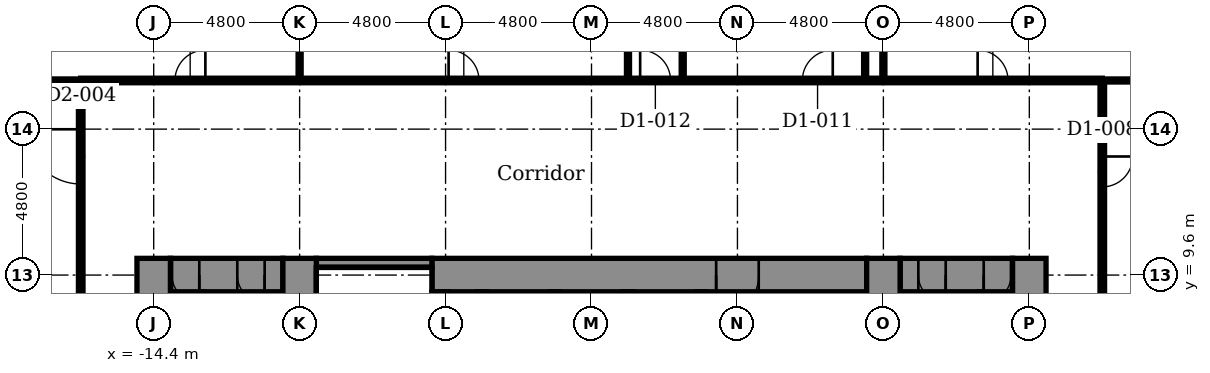
"""IFC4 building model, lengths in metres.
Left out: names, types, materials, properties, quantities, classifications, styles, units other than length and angle.
Written with IfcOpenShell. Run it as: python <this file> out.ifc"""

import sys

from ifc_helpers import new_model, si_unit, direction, frame, frame_2d, origin, place, context, subcontext, project, spatial, rectangle, extrude, element, fill, save


model = new_model("IFC4")
c1 = context("Model", 3, precision=1e-05, world=origin(), true_north=direction((0.0, 1.0)))
c2 = subcontext(c1, "Body", "Model", "MODEL_VIEW")
j1 = project(units=[si_unit("LENGTHUNIT", "METRE"), si_unit("PLANEANGLEUNIT", "RADIAN")], contexts=[c1])
p1 = place(None, origin())
s1 = spatial("IfcSite", under=j1, at=p1, CompositionType="ELEMENT")
p2 = place(p1, origin())
s2 = spatial("IfcBuilding", under=s1, at=p2, CompositionType="ELEMENT")
p3 = place(p2, origin())
s3 = spatial("IfcBuildingStorey", under=s2, at=p3, CompositionType="ELEMENT", Elevation=0.0)
p4 = place(p3, frame((-13.85, 9.6, -0.4), z_axis=(0.0, 0.0, 1.0), x_axis=(1.0, 0.0, 0.0)))
e1 = element("IfcWall", 1, at=p4, inside=s3, PredefinedType="SHEAR", context=c2, shape_type="SweptSolid", body=[
    extrude(rectangle(XDim=3.7, YDim=1.1, at=frame_2d((1.85, 0.0))), origin(), (0.0, 0.0, 1.0), 7.1),
])
p5 = place(p4, frame((0.05, 0.0, 0.4)))
e2 = element("IfcOpeningElement", 2, at=p5, cuts=e1, PredefinedType="OPENING", context=c2, shape_type="SweptSolid", body=[
    extrude(rectangle(XDim=0.9, YDim=2.1, at=frame_2d((0.45, 1.05))), frame((0.0, 0.56, 0.0), z_axis=(0.0, -1.0, 0.0), x_axis=(1.0, 0.0, 0.0)), (0.0, 0.0, 1.0), 1.12),
])
p6 = place(p4, frame((2.2, 0.0, 0.4)))
e3 = element("IfcOpeningElement", 3, at=p6, cuts=e1, PredefinedType="OPENING", context=c2, shape_type="SweptSolid", body=[
    extrude(rectangle(XDim=0.9, YDim=2.1, at=frame_2d((0.45, 1.05))), frame((0.0, 0.56, 0.0), z_axis=(0.0, -1.0, 0.0), x_axis=(1.0, 0.0, 0.0)), (0.0, 0.0, 1.0), 1.12),
])
p7 = place(p3, frame((-5.25, 9.6, -0.4), z_axis=(0.0, 0.0, 1.0), x_axis=(1.0, 0.0, 0.0)))
e4 = element("IfcWall", 4, at=p7, inside=s3, PredefinedType="SHEAR", context=c2, shape_type="SweptSolid", body=[
    extrude(rectangle(XDim=14.3, YDim=1.1, at=frame_2d((7.15, 0.0))), origin(), (0.0, 0.0, 1.0), 7.1),
])
p8 = place(p7, frame((9.35, 0.0, 0.4)))
e5 = element("IfcOpeningElement", 5, at=p8, cuts=e4, PredefinedType="OPENING", context=c2, shape_type="SweptSolid", body=[
    extrude(rectangle(XDim=1.4, YDim=2.1, at=frame_2d((0.7, 1.05))), frame((0.0, 0.56, 0.0), z_axis=(0.0, -1.0, 0.0), x_axis=(1.0, 0.0, 0.0)), (0.0, 0.0, 1.0), 1.12),
])
p9 = place(p3, frame((10.15, 9.6, -0.4), z_axis=(0.0, 0.0, 1.0), x_axis=(1.0, 0.0, 0.0)))
e6 = element("IfcWall", 6, at=p9, inside=s3, PredefinedType="SHEAR", context=c2, shape_type="SweptSolid", body=[
    extrude(rectangle(XDim=3.7, YDim=1.1, at=frame_2d((1.85, 0.0))), origin(), (0.0, 0.0, 1.0), 7.1),
])
p10 = place(p9, frame((0.6, 0.0, 0.4)))
e7 = element("IfcOpeningElement", 7, at=p10, cuts=e6, PredefinedType="OPENING", context=c2, shape_type="SweptSolid", body=[
    extrude(rectangle(XDim=0.9, YDim=2.1, at=frame_2d((0.45, 1.05))), frame((0.0, 0.56, 0.0), z_axis=(0.0, -1.0, 0.0), x_axis=(1.0, 0.0, 0.0)), (0.0, 0.0, 1.0), 1.12),
])
p11 = place(p9, frame((2.75, 0.0, 0.4)))
e8 = element("IfcOpeningElement", 8, at=p11, cuts=e6, PredefinedType="OPENING", context=c2, shape_type="SweptSolid", body=[
    extrude(rectangle(XDim=0.9, YDim=2.1, at=frame_2d((0.45, 1.05))), frame((0.0, 0.56, 0.0), z_axis=(0.0, -1.0, 0.0), x_axis=(1.0, 0.0, 0.0)), (0.0, 0.0, 1.0), 1.12),
])
p12 = place(p3, frame((-9.05, 10.0, -0.4), z_axis=(0.0, 0.0, 1.0), x_axis=(1.0, 0.0, 0.0)))
e9 = element("IfcWall", 9, at=p12, inside=s3, PredefinedType="STANDARD", context=c2, shape_type="SweptSolid", body=[
    extrude(rectangle(XDim=3.8, YDim=0.3, at=frame_2d((1.9, 0.0))), origin(), (0.0, 0.0, 1.0), 7.1),
])
p13 = place(p3, frame((-14.4, -10.15, -0.4), z_axis=(0.0, 0.0, 1.0), x_axis=(0.0, 1.0, 0.0)))
e10 = element("IfcWall", 10, at=p13, inside=s3, PredefinedType="SHEAR", context=c2, shape_type="SweptSolid", body=[
    extrude(rectangle(XDim=20.3, YDim=1.1, at=frame_2d((10.15, 0.0))), origin(), (0.0, 0.0, 1.0), 7.1),
])
p14 = place(p13, frame((3.6, 0.0, 0.4)))
e11 = element("IfcOpeningElement", 11, at=p14, cuts=e10, PredefinedType="OPENING", context=c2, shape_type="SweptSolid", body=[
    extrude(rectangle(XDim=1.1, YDim=2.1, at=frame_2d((0.55, 1.05))), frame((0.0, 0.56, 0.0), z_axis=(0.0, -1.0, 0.0), x_axis=(1.0, 0.0, 0.0)), (0.0, 0.0, 1.0), 1.12),
])
p15 = place(p13, frame((6.0, 0.0, 0.4)))
e12 = element("IfcOpeningElement", 12, at=p15, cuts=e10, PredefinedType="OPENING", context=c2, shape_type="SweptSolid", body=[
    extrude(rectangle(XDim=1.1, YDim=2.1, at=frame_2d((0.55, 1.05))), frame((0.0, 0.56, 0.0), z_axis=(0.0, -1.0, 0.0), x_axis=(1.0, 0.0, 0.0)), (0.0, 0.0, 1.0), 1.12),
])
p16 = place(p13, frame((8.4, 0.0, 0.4)))
e13 = element("IfcOpeningElement", 13, at=p16, cuts=e10, PredefinedType="OPENING", context=c2, shape_type="SweptSolid", body=[
    extrude(rectangle(XDim=1.1, YDim=2.1, at=frame_2d((0.55, 1.05))), frame((0.0, 0.56, 0.0), z_axis=(0.0, -1.0, 0.0), x_axis=(1.0, 0.0, 0.0)), (0.0, 0.0, 1.0), 1.12),
])
p17 = place(p13, frame((10.8, 0.0, 0.4)))
e14 = element("IfcOpeningElement", 14, at=p17, cuts=e10, PredefinedType="OPENING", context=c2, shape_type="SweptSolid", body=[
    extrude(rectangle(XDim=1.1, YDim=2.1, at=frame_2d((0.55, 1.05))), frame((0.0, 0.56, 0.0), z_axis=(0.0, -1.0, 0.0), x_axis=(1.0, 0.0, 0.0)), (0.0, 0.0, 1.0), 1.12),
])
p18 = place(p13, frame((13.2, 0.0, 0.4)))
e15 = element("IfcOpeningElement", 15, at=p18, cuts=e10, PredefinedType="OPENING", context=c2, shape_type="SweptSolid", body=[
    extrude(rectangle(XDim=1.1, YDim=2.1, at=frame_2d((0.55, 1.05))), frame((0.0, 0.56, 0.0), z_axis=(0.0, -1.0, 0.0), x_axis=(1.0, 0.0, 0.0)), (0.0, 0.0, 1.0), 1.12),
])
p19 = place(p13, frame((15.6, 0.0, 0.4)))
e16 = element("IfcOpeningElement", 16, at=p19, cuts=e10, PredefinedType="OPENING", context=c2, shape_type="SweptSolid", body=[
    extrude(rectangle(XDim=1.1, YDim=2.1, at=frame_2d((0.55, 1.05))), frame((0.0, 0.56, 0.0), z_axis=(0.0, -1.0, 0.0), x_axis=(1.0, 0.0, 0.0)), (0.0, 0.0, 1.0), 1.12),
])
p20 = place(p3, frame((-9.6, 2.55, -0.4), z_axis=(0.0, 0.0, 1.0), x_axis=(0.0, 1.0, 0.0)))
e17 = element("IfcWall", 17, at=p20, inside=s3, PredefinedType="SHEAR", context=c2, shape_type="SweptSolid", body=[
    extrude(rectangle(XDim=7.6, YDim=1.1, at=frame_2d((3.8, 0.0))), origin(), (0.0, 0.0, 1.0), 7.1),
])
p21 = place(p3, frame((-5.1, 2.25, -0.4), z_axis=(0.0, 0.0, 1.0), x_axis=(0.0, 1.0, 0.0)))
e18 = element("IfcWall", 18, at=p21, inside=s3, PredefinedType="STANDARD", context=c2, shape_type="SweptSolid", body=[
    extrude(rectangle(XDim=6.8, YDim=0.3, at=frame_2d((3.4, 0.0))), origin(), (0.0, 0.0, 1.0), 7.1),
])
p22 = place(p21, frame((2.0, 0.0, 0.4)))
e19 = element("IfcOpeningElement", 19, at=p22, cuts=e18, PredefinedType="OPENING", context=c2, shape_type="SweptSolid", body=[
    extrude(rectangle(XDim=1.2, YDim=2.1, at=frame_2d((0.6, 1.05))), frame((0.0, 0.16, 0.0), z_axis=(0.0, -1.0, 0.0), x_axis=(1.0, 0.0, 0.0)), (0.0, 0.0, 1.0), 0.32),
])
for number, where, z_axis, x_axis in (
    (20, (-3.6, 5.85, -0.4), (0.0, 0.0, 1.0), (0.0, 1.0, 0.0)),
    (21, (-1.2, 5.85, -0.4), (0.0, 0.0, 1.0), (0.0, 1.0, 0.0)),
    (22, (1.2, 5.85, -0.4), (0.0, 0.0, 1.0), (0.0, 1.0, 0.0)),
    (23, (3.6, 5.85, -0.4), (0.0, 0.0, 1.0), (0.0, 1.0, 0.0)),
):
    element("IfcWall", number, at=place(p3, frame(where, z_axis=z_axis, x_axis=x_axis)), inside=s3, PredefinedType="STANDARD", context=c2, shape_type="SweptSolid", body=[
        extrude(rectangle(XDim=3.2, YDim=0.3, at=frame_2d((1.6, 0.0))), origin(), (0.0, 0.0, 1.0), 7.1),
    ])
p23 = place(p3, frame((9.6, -10.15, -0.4), z_axis=(0.0, 0.0, 1.0), x_axis=(0.0, 1.0, 0.0)))
e24 = element("IfcWall", 24, at=p23, inside=s3, PredefinedType="SHEAR", context=c2, shape_type="SweptSolid", body=[
    extrude(rectangle(XDim=20.3, YDim=1.1, at=frame_2d((10.15, 0.0))), origin(), (0.0, 0.0, 1.0), 7.1),
])
p24 = place(p3, frame((14.4, -10.15, -0.4), z_axis=(0.0, 0.0, 1.0), x_axis=(0.0, 1.0, 0.0)))
e25 = element("IfcWall", 25, at=p24, inside=s3, PredefinedType="SHEAR", context=c2, shape_type="SweptSolid", body=[
    extrude(rectangle(XDim=20.3, YDim=1.1, at=frame_2d((10.15, 0.0))), origin(), (0.0, 0.0, 1.0), 7.1),
])
p25 = place(p24, frame((3.6, 0.0, 0.4)))
e26 = element("IfcOpeningElement", 26, at=p25, cuts=e25, PredefinedType="OPENING", context=c2, shape_type="SweptSolid", body=[
    extrude(rectangle(XDim=1.1, YDim=2.1, at=frame_2d((0.55, 1.05))), frame((0.0, 0.56, 0.0), z_axis=(0.0, -1.0, 0.0), x_axis=(1.0, 0.0, 0.0)), (0.0, 0.0, 1.0), 1.12),
])
p26 = place(p24, frame((6.0, 0.0, 0.4)))
e27 = element("IfcOpeningElement", 27, at=p26, cuts=e25, PredefinedType="OPENING", context=c2, shape_type="SweptSolid", body=[
    extrude(rectangle(XDim=1.1, YDim=2.1, at=frame_2d((0.55, 1.05))), frame((0.0, 0.56, 0.0), z_axis=(0.0, -1.0, 0.0), x_axis=(1.0, 0.0, 0.0)), (0.0, 0.0, 1.0), 1.12),
])
p27 = place(p24, frame((8.4, 0.0, 0.4)))
e28 = element("IfcOpeningElement", 28, at=p27, cuts=e25, PredefinedType="OPENING", context=c2, shape_type="SweptSolid", body=[
    extrude(rectangle(XDim=1.1, YDim=2.1, at=frame_2d((0.55, 1.05))), frame((0.0, 0.56, 0.0), z_axis=(0.0, -1.0, 0.0), x_axis=(1.0, 0.0, 0.0)), (0.0, 0.0, 1.0), 1.12),
])
p28 = place(p24, frame((10.8, 0.0, 0.4)))
e29 = element("IfcOpeningElement", 29, at=p28, cuts=e25, PredefinedType="OPENING", context=c2, shape_type="SweptSolid", body=[
    extrude(rectangle(XDim=1.1, YDim=2.1, at=frame_2d((0.55, 1.05))), frame((0.0, 0.56, 0.0), z_axis=(0.0, -1.0, 0.0), x_axis=(1.0, 0.0, 0.0)), (0.0, 0.0, 1.0), 1.12),
])
p29 = place(p24, frame((13.2, 0.0, 0.4)))
e30 = element("IfcOpeningElement", 30, at=p29, cuts=e25, PredefinedType="OPENING", context=c2, shape_type="SweptSolid", body=[
    extrude(rectangle(XDim=1.1, YDim=2.1, at=frame_2d((0.55, 1.05))), frame((0.0, 0.56, 0.0), z_axis=(0.0, -1.0, 0.0), x_axis=(1.0, 0.0, 0.0)), (0.0, 0.0, 1.0), 1.12),
])
p30 = place(p24, frame((15.6, 0.0, 0.4)))
e31 = element("IfcOpeningElement", 31, at=p30, cuts=e25, PredefinedType="OPENING", context=c2, shape_type="SweptSolid", body=[
    extrude(rectangle(XDim=1.1, YDim=2.1, at=frame_2d((0.55, 1.05))), frame((0.0, 0.56, 0.0), z_axis=(0.0, -1.0, 0.0), x_axis=(1.0, 0.0, 0.0)), (0.0, 0.0, 1.0), 1.12),
])
p31 = place(p3, frame((16.8, 3.95, 0.0), z_axis=(0.0, 0.0, 1.0), x_axis=(0.0, 1.0, 0.0)))
e32 = element("IfcWall", 32, at=p31, inside=s3, PredefinedType="PARTITIONING", context=c2, shape_type="SweptSolid", body=[
    extrude(rectangle(XDim=12.05, YDim=0.15, at=frame_2d((6.025, 0.0))), origin(), (0.0, 0.0, 1.0), 6.7),
])
p32 = place(p31, frame((0.95, 0.0, 0.0)))
e33 = element("IfcOpeningElement", 33, at=p32, cuts=e32, PredefinedType="OPENING", context=c2, shape_type="SweptSolid", body=[
    extrude(rectangle(XDim=1.0, YDim=2.1, at=frame_2d((0.5, 1.05))), frame((0.0, 0.085, 0.0), z_axis=(0.0, -1.0, 0.0), x_axis=(1.0, 0.0, 0.0)), (0.0, 0.0, 1.0), 0.17),
])
p33 = place(p31, frame((8.55, 0.0, 0.0)))
e34 = element("IfcOpeningElement", 34, at=p33, cuts=e32, PredefinedType="OPENING", context=c2, shape_type="SweptSolid", body=[
    extrude(rectangle(XDim=1.0, YDim=2.1, at=frame_2d((0.5, 1.05))), frame((0.0, 0.085, 0.0), z_axis=(0.0, -1.0, 0.0), x_axis=(1.0, 0.0, 0.0)), (0.0, 0.0, 1.0), 0.17),
])
p34 = place(p3, frame((12.8, 7.35, 0.0), z_axis=(0.0, 0.0, 1.0), x_axis=(0.0, 1.0, 0.0)))
e35 = element("IfcWall", 35, at=p34, inside=s3, PredefinedType="PARTITIONING", context=c2, shape_type="SweptSolid", body=[
    extrude(rectangle(XDim=1.7, YDim=0.1, at=frame_2d((0.85, 0.0))), origin(), (0.0, 0.0, 1.0), 6.7),
])
p35 = place(p3, frame((9.6, 16.0, 0.0), z_axis=(0.0, 0.0, 1.0), x_axis=(0.0, 1.0, 0.0)))
e36 = element("IfcWall", 36, at=p35, inside=s3, PredefinedType="PARTITIONING", context=c2, shape_type="SweptSolid", body=[
    extrude(rectangle(XDim=2.64, YDim=0.1, at=frame_2d((1.32, 0.0))), origin(), (0.0, 0.0, 1.0), 6.293),
])
for number, where, z_axis, x_axis in (
    (37, (9.0, 16.0, 0.0), (0.0, 0.0, 1.0), (0.0, 1.0, 0.0)),
    (38, (3.0, 16.0, 0.0), (0.0, 0.0, 1.0), (0.0, 1.0, 0.0)),
):
    element("IfcWall", number, at=place(p3, frame(where, z_axis=z_axis, x_axis=x_axis)), inside=s3, PredefinedType="PARTITIONING", context=c2, shape_type="SweptSolid", body=[
        extrude(rectangle(XDim=4.7, YDim=0.1, at=frame_2d((2.35, 0.0))), origin(), (0.0, 0.0, 1.0), 6.7),
    ])
p36 = place(p3, frame((1.2, 16.0, 0.0), z_axis=(0.0, 0.0, 1.0), x_axis=(0.0, 1.0, 0.0)))
e39 = element("IfcWall", 39, at=p36, inside=s3, PredefinedType="PARTITIONING", context=c2, shape_type="SweptSolid", body=[
    extrude(rectangle(XDim=33.713, YDim=0.1, at=frame_2d((16.856, 0.0))), origin(), (0.0, 0.0, 1.0), 6.7),
])
p37 = place(p3, frame((-4.8, 6.0, 0.0), z_axis=(0.0, 0.0, 1.0), x_axis=(0.0, 1.0, 0.0)))
e40 = element("IfcWall", 40, at=p37, inside=s3, PredefinedType="PARTITIONING", context=c2, shape_type="SweptSolid", body=[
    extrude(rectangle(XDim=3.05, YDim=0.15, at=frame_2d((1.525, 0.0))), origin(), (0.0, 0.0, 1.0), 6.7),
])
p38 = place(p3, frame((-9.6, 16.0, 0.0), z_axis=(0.0, 0.0, 1.0), x_axis=(0.0, 1.0, 0.0)))
e41 = element("IfcWall", 41, at=p38, inside=s3, PredefinedType="PARTITIONING", context=c2, shape_type="SweptSolid", body=[
    extrude(rectangle(XDim=2.64, YDim=0.1, at=frame_2d((1.32, 0.0))), origin(), (0.0, 0.0, 1.0), 6.293),
])
p39 = place(p3, frame((-12.8, 7.35, 0.0), z_axis=(0.0, 0.0, 1.0), x_axis=(0.0, 1.0, 0.0)))
e42 = element("IfcWall", 42, at=p39, inside=s3, PredefinedType="PARTITIONING", context=c2, shape_type="SweptSolid", body=[
    extrude(rectangle(XDim=1.7, YDim=0.1, at=frame_2d((0.85, 0.0))), origin(), (0.0, 0.0, 1.0), 6.7),
])
p40 = place(p3, frame((-16.8, 3.95, 0.0), z_axis=(0.0, 0.0, 1.0), x_axis=(0.0, 1.0, 0.0)))
e43 = element("IfcWall", 43, at=p40, inside=s3, PredefinedType="PARTITIONING", context=c2, shape_type="SweptSolid", body=[
    extrude(rectangle(XDim=12.05, YDim=0.15, at=frame_2d((6.025, 0.0))), origin(), (0.0, 0.0, 1.0), 6.7),
])
p41 = place(p40, frame((0.95, 0.0, 0.0)))
e44 = element("IfcOpeningElement", 44, at=p41, cuts=e43, PredefinedType="OPENING", context=c2, shape_type="SweptSolid", body=[
    extrude(rectangle(XDim=1.0, YDim=2.1, at=frame_2d((0.5, 1.05))), frame((0.0, 0.085, 0.0), z_axis=(0.0, -1.0, 0.0), x_axis=(1.0, 0.0, 0.0)), (0.0, 0.0, 1.0), 0.17),
])
p42 = place(p40, frame((8.645, 0.0, 0.0)))
e45 = element("IfcOpeningElement", 45, at=p42, cuts=e43, PredefinedType="OPENING", context=c2, shape_type="SweptSolid", body=[
    extrude(rectangle(XDim=1.8, YDim=2.1, at=frame_2d((0.9, 1.05))), frame((0.0, 0.085, 0.0), z_axis=(0.0, -1.0, 0.0), x_axis=(1.0, 0.0, 0.0)), (0.0, 0.0, 1.0), 0.17),
])
for number, where, z_axis, x_axis in (
    (46, (-21.6, 16.0, 0.0), (0.0, 0.0, 1.0), (1.0, 0.0, 0.0)),
    (47, (16.8, 16.0, 0.0), (0.0, 0.0, 1.0), (1.0, 0.0, 0.0)),
):
    element("IfcWall", number, at=place(p3, frame(where, z_axis=z_axis, x_axis=x_axis)), inside=s3, PredefinedType="PARTITIONING", context=c2, shape_type="SweptSolid", body=[
        extrude(rectangle(XDim=4.8, YDim=0.1, at=frame_2d((2.4, 0.0))), origin(), (0.0, 0.0, 1.0), 6.7),
    ])
p43 = place(p3, frame((-16.8, 16.0, 0.0), z_axis=(0.0, 0.0, 1.0), x_axis=(1.0, 0.0, 0.0)))
e48 = element("IfcWall", 48, at=p43, inside=s3, PredefinedType="PARTITIONING", context=c2, shape_type="SweptSolid", body=[
    extrude(rectangle(XDim=33.6, YDim=0.15, at=frame_2d((16.8, 0.0))), origin(), (0.0, 0.0, 1.0), 6.7),
])
p44 = place(p43, frame((3.1, 0.0, 0.0)))
e49 = element("IfcOpeningElement", 49, at=p44, cuts=e48, PredefinedType="OPENING", context=c2, shape_type="SweptSolid", body=[
    extrude(rectangle(XDim=1.0, YDim=2.1, at=frame_2d((0.5, 1.05))), frame((0.0, 0.085, 0.0), z_axis=(0.0, -1.0, 0.0), x_axis=(1.0, 0.0, 0.0)), (0.0, 0.0, 1.0), 0.17),
])
p45 = place(p43, frame((12.1, 0.0, 0.0)))
e50 = element("IfcOpeningElement", 50, at=p45, cuts=e48, PredefinedType="OPENING", context=c2, shape_type="SweptSolid", body=[
    extrude(rectangle(XDim=1.0, YDim=2.1, at=frame_2d((0.5, 1.05))), frame((0.0, 0.085, 0.0), z_axis=(0.0, -1.0, 0.0), x_axis=(1.0, 0.0, 0.0)), (0.0, 0.0, 1.0), 0.17),
])
p46 = place(p43, frame((29.5, 0.0, 0.0)))
e51 = element("IfcOpeningElement", 51, at=p46, cuts=e48, PredefinedType="OPENING", context=c2, shape_type="SweptSolid", body=[
    extrude(rectangle(XDim=1.0, YDim=2.1, at=frame_2d((0.5, 1.05))), frame((0.0, 0.085, 0.0), z_axis=(0.0, -1.0, 0.0), x_axis=(1.0, 0.0, 0.0)), (0.0, 0.0, 1.0), 0.17),
])
p47 = place(p43, frame((23.735, 0.0, 0.0)))
e52 = element("IfcOpeningElement", 52, at=p47, cuts=e48, PredefinedType="OPENING", context=c2, shape_type="SweptSolid", body=[
    extrude(rectangle(XDim=1.0, YDim=2.1, at=frame_2d((0.5, 1.05))), frame((0.0, 0.085, 0.0), z_axis=(0.0, -1.0, 0.0), x_axis=(1.0, 0.0, 0.0)), (0.0, 0.0, 1.0), 0.17),
])
p48 = place(p43, frame((18.4, 0.0, 0.0)))
e53 = element("IfcOpeningElement", 53, at=p48, cuts=e48, PredefinedType="OPENING", context=c2, shape_type="SweptSolid", body=[
    extrude(rectangle(XDim=1.0, YDim=2.1, at=frame_2d((0.5, 1.05))), frame((0.0, 0.085, 0.0), z_axis=(0.0, -1.0, 0.0), x_axis=(1.0, 0.0, 0.0)), (0.0, 0.0, 1.0), 0.17),
])
p49 = place(p44, origin())
e54 = element("IfcDoor", 54, at=p49, inside=s3, OperationType="SINGLE_SWING_RIGHT", PredefinedType="DOOR", context=c2, shape_type="SweptSolid", body=[
    extrude(rectangle(XDim=1.0, YDim=2.1, at=frame_2d((0.5, 1.05))), frame((0.0, 0.025, 0.0), z_axis=(0.0, -1.0, 0.0), x_axis=(1.0, 0.0, 0.0)), (0.0, 0.0, 1.0), 0.05),
])
fill(e49, e54)
p50 = place(p45, origin())
e55 = element("IfcDoor", 55, at=p50, inside=s3, OperationType="SINGLE_SWING_LEFT", PredefinedType="DOOR", context=c2, shape_type="SweptSolid", body=[
    extrude(rectangle(XDim=1.0, YDim=2.1, at=frame_2d((0.5, 1.05))), frame((0.0, 0.025, 0.0), z_axis=(0.0, -1.0, 0.0), x_axis=(1.0, 0.0, 0.0)), (0.0, 0.0, 1.0), 0.05),
])
fill(e50, e55)
p51 = place(p46, origin())
e56 = element("IfcDoor", 56, at=p51, inside=s3, OperationType="SINGLE_SWING_LEFT", PredefinedType="DOOR", context=c2, shape_type="SweptSolid", body=[
    extrude(rectangle(XDim=1.0, YDim=2.1, at=frame_2d((0.5, 1.05))), frame((0.0, 0.025, 0.0), z_axis=(0.0, -1.0, 0.0), x_axis=(1.0, 0.0, 0.0)), (0.0, 0.0, 1.0), 0.05),
])
fill(e51, e56)
p52 = place(p33, frame((1.0, 0.0, 0.0), z_axis=(0.0, 0.0, 1.0), x_axis=(-1.0, 0.0, 0.0)))
e57 = element("IfcDoor", 57, at=p52, inside=s3, OperationType="SINGLE_SWING_RIGHT", PredefinedType="DOOR", context=c2, shape_type="SweptSolid", body=[
    extrude(rectangle(XDim=1.0, YDim=2.1, at=frame_2d((0.5, 1.05))), frame((0.0, 0.025, 0.0), z_axis=(0.0, -1.0, 0.0), x_axis=(1.0, 0.0, 0.0)), (0.0, 0.0, 1.0), 0.05),
])
fill(e34, e57)
p53 = place(p42, origin())
e58 = element("IfcDoor", 58, at=p53, inside=s3, OperationType="SINGLE_SWING_RIGHT", PredefinedType="DOOR", context=c2, shape_type="SweptSolid", body=[
    extrude(rectangle(XDim=1.8, YDim=2.1, at=frame_2d((0.9, 1.05))), frame((0.0, 0.025, 0.0), z_axis=(0.0, -1.0, 0.0), x_axis=(1.0, 0.0, 0.0)), (0.0, 0.0, 1.0), 0.05),
])
fill(e45, e58)
p54 = place(p47, origin())
e59 = element("IfcDoor", 59, at=p54, inside=s3, OperationType="SINGLE_SWING_RIGHT", PredefinedType="DOOR", context=c2, shape_type="SweptSolid", body=[
    extrude(rectangle(XDim=1.0, YDim=2.1, at=frame_2d((0.5, 1.05))), frame((0.0, 0.025, 0.0), z_axis=(0.0, -1.0, 0.0), x_axis=(1.0, 0.0, 0.0)), (0.0, 0.0, 1.0), 0.05),
])
fill(e52, e59)
p55 = place(p48, origin())
e60 = element("IfcDoor", 60, at=p55, inside=s3, OperationType="SINGLE_SWING_LEFT", PredefinedType="DOOR", context=c2, shape_type="SweptSolid", body=[
    extrude(rectangle(XDim=1.0, YDim=2.1, at=frame_2d((0.5, 1.05))), frame((0.0, 0.025, 0.0), z_axis=(0.0, -1.0, 0.0), x_axis=(1.0, 0.0, 0.0)), (0.0, 0.0, 1.0), 0.05),
])
fill(e53, e60)
p56 = place(p10, frame((0.9, 0.0, 0.0), z_axis=(0.0, 0.0, 1.0), x_axis=(-1.0, 0.0, 0.0)))
e61 = element("IfcDoor", 61, at=p56, inside=s3, OperationType="SINGLE_SWING_RIGHT", PredefinedType="DOOR", context=c2, shape_type="SweptSolid", body=[
    extrude(rectangle(XDim=0.9, YDim=2.1, at=frame_2d((0.45, 1.05))), frame((0.0, 0.025, 0.0), z_axis=(0.0, -1.0, 0.0), x_axis=(1.0, 0.0, 0.0)), (0.0, 0.0, 1.0), 0.05),
])
fill(e7, e61)
p57 = place(p11, frame((0.9, 0.0, 0.0), z_axis=(0.0, 0.0, 1.0), x_axis=(-1.0, 0.0, 0.0)))
e62 = element("IfcDoor", 62, at=p57, inside=s3, OperationType="SINGLE_SWING_LEFT", PredefinedType="DOOR", context=c2, shape_type="SweptSolid", body=[
    extrude(rectangle(XDim=0.9, YDim=2.1, at=frame_2d((0.45, 1.05))), frame((0.0, 0.025, 0.0), z_axis=(0.0, -1.0, 0.0), x_axis=(1.0, 0.0, 0.0)), (0.0, 0.0, 1.0), 0.05),
])
fill(e8, e62)
p58 = place(p5, frame((0.9, 0.0, 0.0), z_axis=(0.0, 0.0, 1.0), x_axis=(-1.0, 0.0, 0.0)))
e63 = element("IfcDoor", 63, at=p58, inside=s3, OperationType="SINGLE_SWING_RIGHT", PredefinedType="DOOR", context=c2, shape_type="SweptSolid", body=[
    extrude(rectangle(XDim=0.9, YDim=2.1, at=frame_2d((0.45, 1.05))), frame((0.0, 0.025, 0.0), z_axis=(0.0, -1.0, 0.0), x_axis=(1.0, 0.0, 0.0)), (0.0, 0.0, 1.0), 0.05),
])
fill(e2, e63)
p59 = place(p6, frame((0.9, 0.0, 0.0), z_axis=(0.0, 0.0, 1.0), x_axis=(-1.0, 0.0, 0.0)))
e64 = element("IfcDoor", 64, at=p59, inside=s3, OperationType="SINGLE_SWING_RIGHT", PredefinedType="DOOR", context=c2, shape_type="SweptSolid", body=[
    extrude(rectangle(XDim=0.9, YDim=2.1, at=frame_2d((0.45, 1.05))), frame((0.0, 0.025, 0.0), z_axis=(0.0, -1.0, 0.0), x_axis=(1.0, 0.0, 0.0)), (0.0, 0.0, 1.0), 0.05),
])
fill(e3, e64)
p60 = place(p8, frame((1.4, 0.0, 0.0), z_axis=(0.0, 0.0, 1.0), x_axis=(-1.0, 0.0, 0.0)))
e65 = element("IfcDoor", 65, at=p60, inside=s3, OperationType="SINGLE_SWING_LEFT", PredefinedType="DOOR", context=c2, shape_type="SweptSolid", body=[
    extrude(rectangle(XDim=1.4, YDim=2.1, at=frame_2d((0.7, 1.05))), frame((0.0, 0.025, 0.0), z_axis=(0.0, -1.0, 0.0), x_axis=(1.0, 0.0, 0.0)), (0.0, 0.0, 1.0), 0.05),
])
fill(e5, e65)
save(model, sys.argv[1])
